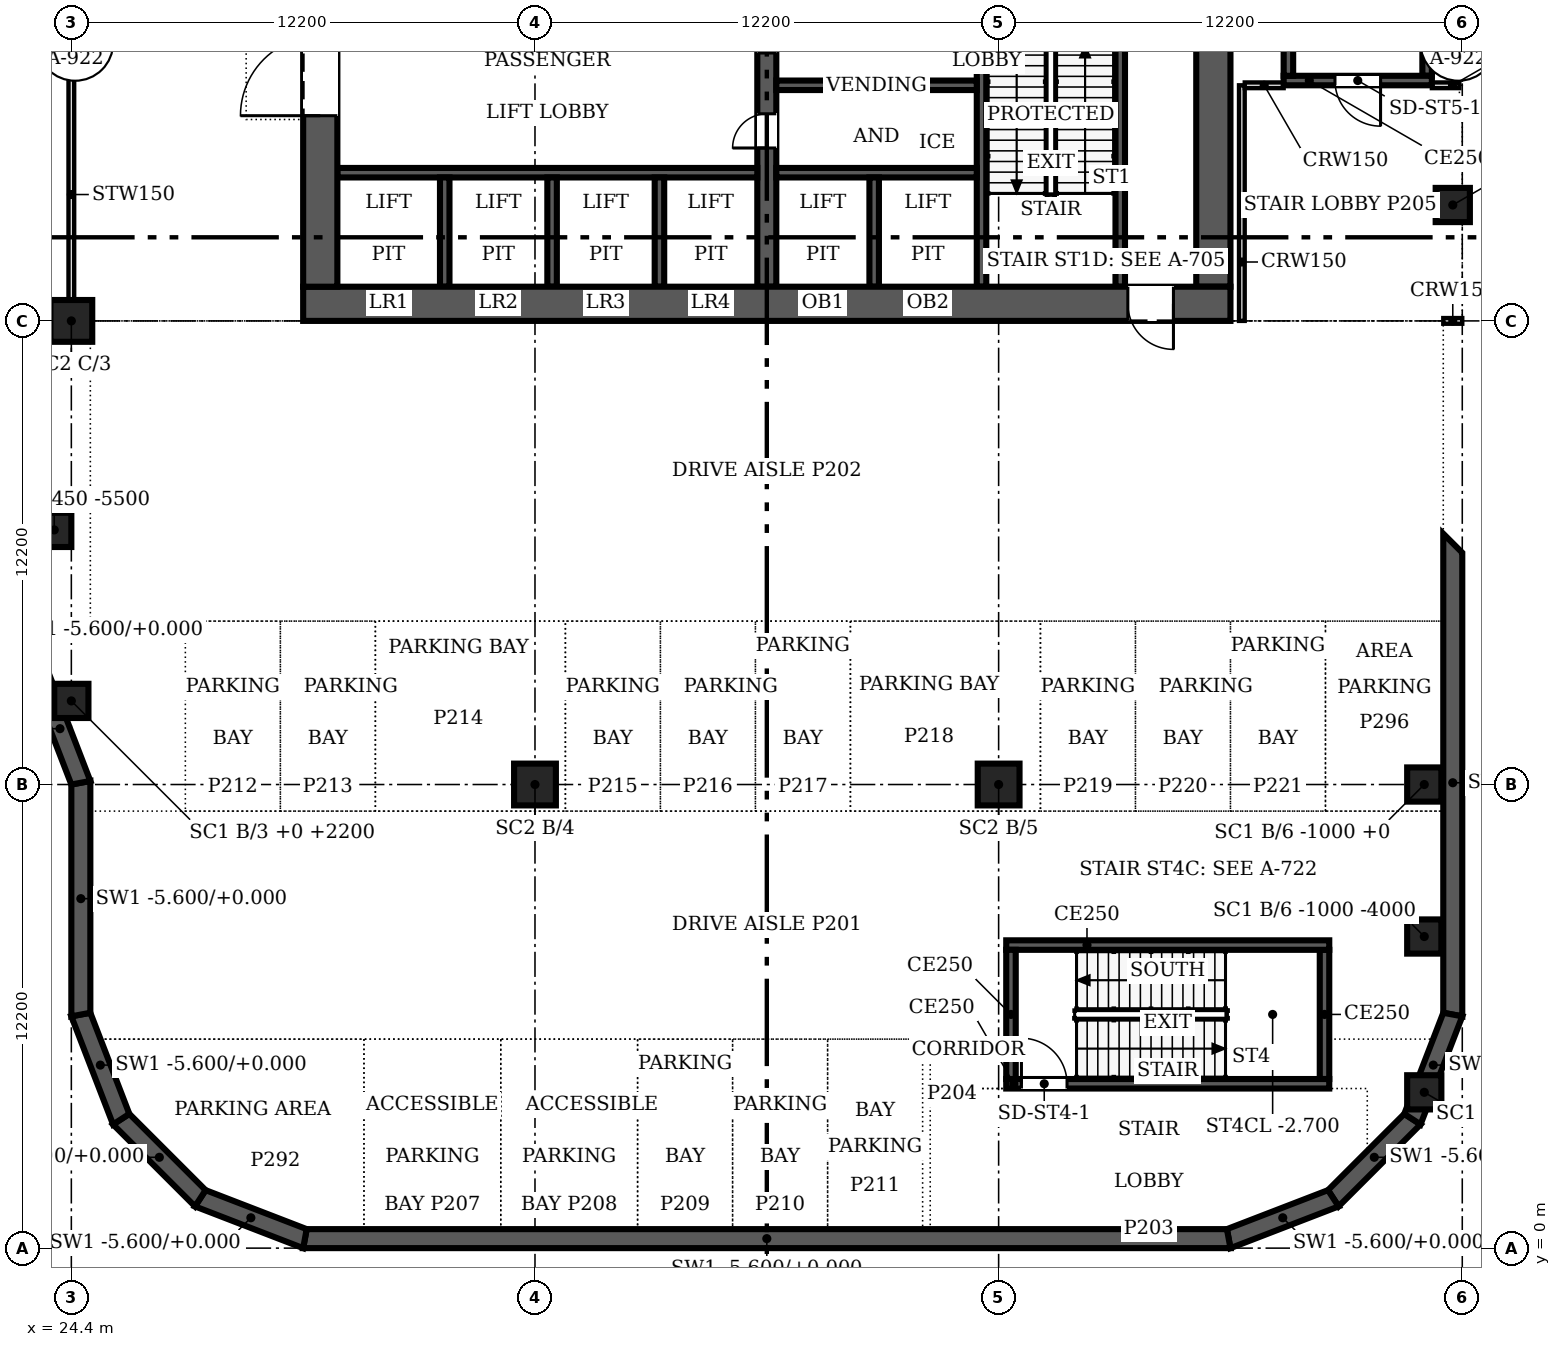
"""IFC4 building model, lengths in metres.
Left out: names, types, materials, properties, quantities, classifications, styles, units other than length and angle.
Written with IfcOpenShell. Run it as: python <this file> out.ifc"""

import sys

from ifc_helpers import new_model, si_unit, direction, frame, frame_2d, origin, origin_2d, place, context, subcontext, project, spatial, polyline, rectangle, outline, extrude, source, transform, mapped, element, fill, save


model = new_model("IFC4")
c1 = context("Model", 3, precision=1e-05, world=origin(), true_north=direction((0.0, 1.0)))
c2 = subcontext(c1, "Body", "Model", "MODEL_VIEW")
j1 = project(units=[si_unit("LENGTHUNIT", "METRE"), si_unit("PLANEANGLEUNIT", "RADIAN")], contexts=[c1])
p1 = place(None, origin())
s1 = spatial("IfcSite", under=j1, at=p1, CompositionType="ELEMENT")
p2 = place(p1, origin())
s2 = spatial("IfcBuilding", under=s1, at=p2, CompositionType="ELEMENT")
p3 = place(p2, frame((0.0, 0.0, -5.4)))
s3 = spatial("IfcBuildingStorey", under=s2, at=p3, CompositionType="ELEMENT", Elevation=-5.4)
p4 = place(p3, frame((0.0, 0.0, -0.2)))
e1 = element("IfcWall", 1, at=p4, inside=s3, PredefinedType="SOLIDWALL", context=c2, shape_type="SweptSolid", body=[
    extrude(outline(polyline([(57.467, 1.526), (57.746, 1.098), (59.902, 3.254), (59.474, 3.533), (57.467, 1.526)])), origin(), (0.0, 0.0, 1.0), 5.6),
])
p5 = place(p3, frame((0.0, 0.0, -0.2)))
e2 = element("IfcWall", 2, at=p5, inside=s3, PredefinedType="SOLIDWALL", context=c2, shape_type="SweptSolid", body=[
    extrude(outline(polyline([(54.807, 0.5), (54.9, 0.0), (57.746, 1.098), (57.467, 1.526), (54.807, 0.5)])), origin(), (0.0, 0.0, 1.0), 5.6),
])
p6 = place(p3, frame((0.0, 0.0, -0.2)))
e3 = element("IfcWall", 3, at=p6, inside=s3, PredefinedType="SOLIDWALL", context=c2, shape_type="SweptSolid", body=[
    extrude(outline(polyline([(30.5, 0.0), (54.9, 0.0), (54.807, 0.5), (30.593, 0.5), (30.5, 0.0)])), origin(), (0.0, 0.0, 1.0), 5.6),
])
p7 = place(p3, frame((0.0, 0.0, -0.2)))
e4 = element("IfcWall", 4, at=p7, inside=s3, PredefinedType="SOLIDWALL", context=c2, shape_type="SweptSolid", body=[
    extrude(outline(polyline([(27.654, 1.098), (30.5, 0.0), (30.593, 0.5), (27.933, 1.526), (27.654, 1.098)])), origin(), (0.0, 0.0, 1.0), 5.6),
])
p8 = place(p3, frame((0.0, 0.0, -0.2)))
e5 = element("IfcWall", 5, at=p8, inside=s3, PredefinedType="SOLIDWALL", context=c2, shape_type="SweptSolid", body=[
    extrude(outline(polyline([(25.498, 3.254), (27.654, 1.098), (27.933, 1.526), (25.926, 3.533), (25.498, 3.254)])), origin(), (0.0, 0.0, 1.0), 5.6),
])
p9 = place(p3, frame((0.0, 0.0, -0.2)))
e6 = element("IfcWall", 6, at=p9, inside=s3, PredefinedType="SOLIDWALL", context=c2, shape_type="SweptSolid", body=[
    extrude(outline(polyline([(24.4, 6.1), (25.498, 3.254), (25.926, 3.533), (24.9, 6.193), (24.4, 6.1)])), origin(), (0.0, 0.0, 1.0), 5.6),
])
p10 = place(p3, frame((0.0, 0.0, -0.2)))
e7 = element("IfcWall", 7, at=p10, inside=s3, PredefinedType="SOLIDWALL", context=c2, shape_type="SweptSolid", body=[
    extrude(outline(polyline([(24.4, 6.1), (24.9, 6.193), (24.9, 12.293), (24.4, 12.2), (24.4, 6.1)])), origin(), (0.0, 0.0, 1.0), 5.6),
])
p11 = place(p3, frame((0.0, 0.0, -0.2)))
e8 = element("IfcWall", 8, at=p11, inside=s3, PredefinedType="SOLIDWALL", context=c2, shape_type="SweptSolid", body=[
    extrude(outline(polyline([(23.302, 15.046), (24.4, 12.2), (24.9, 12.293), (23.731, 15.324), (23.302, 15.046)])), origin(), (0.0, 0.0, 1.0), 5.6),
])
p12 = place(p3, frame((0.0, 0.0, -0.2)))
e9 = element("IfcWall", 9, at=p12, inside=s3, PredefinedType="SOLIDWALL", context=c2, shape_type="SweptSolid", body=[
    extrude(outline(polyline([(60.5, 18.8), (61.0, 18.3), (138.7, 18.3), (138.2, 18.8), (60.5, 18.8)])), origin(), (0.0, 0.0, 1.0), 5.6),
])
p13 = place(p3, frame((0.0, 0.0, -0.2)))
e10 = element("IfcWall", 10, at=p13, inside=s3, PredefinedType="SOLIDWALL", context=c2, shape_type="SweptSolid", body=[
    extrude(outline(polyline([(60.5, 6.193), (61.0, 6.1), (61.0, 18.3), (60.5, 18.8), (60.5, 6.193)])), origin(), (0.0, 0.0, 1.0), 5.6),
])
p14 = place(p3, frame((0.0, 0.0, -0.2)))
e11 = element("IfcWall", 11, at=p14, inside=s3, PredefinedType="SOLIDWALL", context=c2, shape_type="SweptSolid", body=[
    extrude(outline(polyline([(59.474, 3.533), (59.902, 3.254), (61.0, 6.1), (60.5, 6.193), (59.474, 3.533)])), origin(), (0.0, 0.0, 1.0), 5.6),
])
p15 = place(p3, frame((60.75, 27.45, 0.0), z_axis=(0.0, 0.0, 1.0), x_axis=(1.0, 0.0, 0.0)))
e12 = element("IfcColumn", 12, at=p15, inside=s3, PredefinedType="COLUMN", context=c2, shape_type="SweptSolid", body=[
    extrude(rectangle(XDim=0.9, YDim=0.9, at=origin_2d()), origin(), (0.0, 0.0, 1.0), 5.15),
])
for number, where, z_axis, x_axis in (
    (13, (24.4, 24.4, 0.0), (0.0, 0.0, 1.0), (1.0, 0.0, 0.0)),
    (14, (36.6, 12.2, 0.0), (0.0, 0.0, 1.0), (1.0, 0.0, 0.0)),
    (15, (48.8, 12.2, 0.0), (0.0, 0.0, 1.0), (1.0, 0.0, 0.0)),
):
    element("IfcColumn", number, at=place(p3, frame(where, z_axis=z_axis, x_axis=x_axis)), inside=s3, PredefinedType="COLUMN", context=c2, shape_type="SweptSolid", body=[
        extrude(rectangle(XDim=1.1, YDim=1.1, at=origin_2d()), origin(), (0.0, 0.0, 1.0), 5.15),
    ])
for number, where, z_axis, x_axis in (
    (16, (61.0, 19.0, 0.0), (0.0, 0.0, 1.0), (1.0, 0.0, 0.0)),
    (17, (60.0, 12.2, 0.0), (0.0, 0.0, 1.0), (1.0, 0.0, 0.0)),
    (18, (24.4, 14.4, 0.0), (0.0, 0.0, 1.0), (1.0, 0.0, 0.0)),
    (19, (60.0, 8.2, 0.0), (0.0, 0.0, 1.0), (1.0, 0.0, 0.0)),
    (20, (60.0, 4.1, 0.0), (0.0, 0.0, 1.0), (1.0, 0.0, 0.0)),
    (21, (61.0, 18.1, 0.0), (0.0, 0.0, 1.0), (1.0, 0.0, 0.0)),
    (22, (23.95, 18.9, 0.0), (0.0, 0.0, 1.0), (1.0, 0.0, 0.0)),
):
    element("IfcColumn", number, at=place(p3, frame(where, z_axis=z_axis, x_axis=x_axis)), inside=s3, PredefinedType="COLUMN", context=c2, shape_type="SweptSolid", body=[
        extrude(rectangle(XDim=0.9, YDim=0.9, at=origin_2d()), origin(), (0.0, 0.0, 1.0), 5.15),
    ])
p16 = place(p3, frame((54.9, 24.85, 0.0), z_axis=(0.0, 0.0, 1.0), x_axis=(-1.0, 0.0, 0.0)))
e23 = element("IfcWall", 23, at=p16, inside=s3, PredefinedType="SHEAR", context=c2, shape_type="SweptSolid", body=[
    extrude(rectangle(XDim=24.4, YDim=0.9, at=frame_2d((12.2, 0.0))), origin(), (0.0, 0.0, 1.0), 5.4),
])
m1 = source(origin(), c2, "Body", "SweptSolid", [
    extrude(rectangle(XDim=1.2, YDim=2.1, at=frame_2d((0.6, 1.05))), frame((0.0, 0.46, 0.0), z_axis=(0.0, -1.0, 0.0), x_axis=(1.0, 0.0, 0.0)), (0.0, 0.0, 1.0), 0.92),
])
p17 = place(p16, frame((1.5, 0.0, 0.0)))
e24 = element("IfcOpeningElement", 24, at=p17, cuts=e23, PredefinedType="OPENING", context=c2, shape_type="MappedRepresentation", body=[
    mapped(m1, transform((0.0, 0.0, 0.0), scale=1.0)),
])
p18 = place(p3, frame((30.95, 25.3, 0.0), z_axis=(0.0, 0.0, 1.0), x_axis=(0.0, 1.0, 0.0)))
e25 = element("IfcWall", 25, at=p18, inside=s3, PredefinedType="SHEAR", context=c2, shape_type="SweptSolid", body=[
    extrude(rectangle(XDim=22.6, YDim=0.9, at=frame_2d((11.3, 0.0))), origin(), (0.0, 0.0, 1.0), 5.4),
])
m2 = source(origin(), c2, "Body", "SweptSolid", [
    extrude(rectangle(XDim=2.1, YDim=2.4, at=frame_2d((1.05, 1.2))), frame((0.0, 0.46, 0.0), z_axis=(0.0, -1.0, 0.0), x_axis=(1.0, 0.0, 0.0)), (0.0, 0.0, 1.0), 0.92),
])
p19 = place(p18, frame((4.5, 0.0, 0.0)))
e26 = element("IfcOpeningElement", 26, at=p19, cuts=e25, PredefinedType="OPENING", context=c2, shape_type="MappedRepresentation", body=[
    mapped(m2, transform((0.0, 0.0, 0.0), scale=1.0)),
])
p20 = place(p18, frame((16.0, 0.0, 0.0)))
e27 = element("IfcOpeningElement", 27, at=p20, cuts=e25, PredefinedType="OPENING", context=c2, shape_type="MappedRepresentation", body=[
    mapped(m2, transform((0.0, 0.0, 0.0), scale=1.0)),
])
p21 = place(p3, frame((54.45, 47.9, 0.0), z_axis=(0.0, 0.0, 1.0), x_axis=(0.0, -1.0, 0.0)))
e28 = element("IfcWall", 28, at=p21, inside=s3, PredefinedType="SHEAR", context=c2, shape_type="SweptSolid", body=[
    extrude(rectangle(XDim=22.6, YDim=0.9, at=frame_2d((11.3, 0.0))), origin(), (0.0, 0.0, 1.0), 5.4),
])
p22 = place(p21, frame((4.6, 0.0, 0.0)))
e29 = element("IfcOpeningElement", 29, at=p22, cuts=e28, PredefinedType="OPENING", context=c2, shape_type="MappedRepresentation", body=[
    mapped(m1, transform((0.0, 0.0, 0.0), scale=1.0)),
])
p23 = place(p3, frame((42.7, 36.35, 0.0), z_axis=(0.0, 0.0, 1.0), x_axis=(0.0, -1.0, 0.0)))
e30 = element("IfcWall", 30, at=p23, inside=s3, PredefinedType="SHEAR", context=c2, shape_type="SweptSolid", body=[
    extrude(rectangle(XDim=11.05, YDim=0.5, at=frame_2d((5.525, 0.0))), origin(), (0.0, 0.0, 1.0), 5.4),
])
m3 = source(origin(), c2, "Body", "SweptSolid", [
    extrude(rectangle(XDim=0.9, YDim=2.1, at=frame_2d((0.45, 1.05))), frame((0.0, 0.26, 0.0), z_axis=(0.0, -1.0, 0.0), x_axis=(1.0, 0.0, 0.0)), (0.0, 0.0, 1.0), 0.52),
])
p24 = place(p23, frame((6.5, 0.0, 0.0)))
e31 = element("IfcOpeningElement", 31, at=p24, cuts=e30, PredefinedType="OPENING", context=c2, shape_type="MappedRepresentation", body=[
    mapped(m3, transform((0.0, 0.0, 0.0), scale=1.0)),
])
m4 = source(origin(), c2, "Body", "SweptSolid", [
    extrude(rectangle(XDim=1.1, YDim=2.1, at=frame_2d((0.55, 1.05))), frame((0.0, 0.26, 0.0), z_axis=(0.0, -1.0, 0.0), x_axis=(1.0, 0.0, 0.0)), (0.0, 0.0, 1.0), 0.52),
])
p25 = place(p23, frame((3.8, 0.0, 0.0)))
e32 = element("IfcOpeningElement", 32, at=p25, cuts=e30, PredefinedType="OPENING", context=c2, shape_type="MappedRepresentation", body=[
    mapped(m4, transform((0.0, 0.0, 0.0), scale=1.0)),
])
p26 = place(p3, frame((48.35, 36.35, 0.0), z_axis=(0.0, 0.0, 1.0), x_axis=(0.0, -1.0, 0.0)))
e33 = element("IfcWall", 33, at=p26, inside=s3, PredefinedType="SOLIDWALL", context=c2, shape_type="SweptSolid", body=[
    extrude(rectangle(XDim=11.05, YDim=0.25, at=frame_2d((5.525, 0.0))), origin(), (0.0, 0.0, 1.0), 5.4),
])
m5 = source(origin(), c2, "Body", "SweptSolid", [
    extrude(rectangle(XDim=1.2, YDim=2.1, at=frame_2d((0.6, 1.05))), frame((0.0, 0.135, 0.0), z_axis=(0.0, -1.0, 0.0), x_axis=(1.0, 0.0, 0.0)), (0.0, 0.0, 1.0), 0.27),
])
p27 = place(p26, frame((3.225, 0.0, 0.0)))
e34 = element("IfcOpeningElement", 34, at=p27, cuts=e33, PredefinedType="OPENING", context=c2, shape_type="MappedRepresentation", body=[
    mapped(m5, transform((0.0, 0.0, 0.0), scale=1.0)),
])
p28 = place(p3, frame((31.4, 28.3, 0.0), z_axis=(0.0, 0.0, 1.0), x_axis=(1.0, 0.0, 0.0)))
e35 = element("IfcWall", 35, at=p28, inside=s3, PredefinedType="SOLIDWALL", context=c2, shape_type="SweptSolid", body=[
    extrude(rectangle(XDim=11.05, YDim=0.25, at=frame_2d((5.525, 0.0))), origin(), (0.0, 0.0, 1.0), 5.4),
])
p29 = place(p3, frame((42.95, 28.3, 0.0), z_axis=(0.0, 0.0, 1.0), x_axis=(1.0, 0.0, 0.0)))
e36 = element("IfcWall", 36, at=p29, inside=s3, PredefinedType="SOLIDWALL", context=c2, shape_type="SweptSolid", body=[
    extrude(rectangle(XDim=5.275, YDim=0.25, at=frame_2d((2.638, 0.0))), origin(), (0.0, 0.0, 1.0), 5.4),
])
p30 = place(p3, frame((52.0, 25.3, 0.0), z_axis=(0.0, 0.0, 1.0), x_axis=(0.0, 1.0, 0.0)))
e37 = element("IfcWall", 37, at=p30, inside=s3, PredefinedType="SOLIDWALL", context=c2, shape_type="SweptSolid", body=[
    extrude(rectangle(XDim=7.975, YDim=0.25, at=frame_2d((3.987, 0.0))), origin(), (0.0, 0.0, 1.0), 5.4),
])
p31 = place(p30, frame((6.625, 0.0, 0.0)))
e38 = element("IfcOpeningElement", 38, at=p31, cuts=e37, PredefinedType="OPENING", context=c2, shape_type="MappedRepresentation", body=[
    mapped(m5, transform((0.0, 0.0, 0.0), scale=1.0)),
])
p32 = place(p3, frame((42.95, 30.6, 0.0), z_axis=(0.0, 0.0, 1.0), x_axis=(1.0, 0.0, 0.0)))
e39 = element("IfcWall", 39, at=p32, inside=s3, PredefinedType="SOLIDWALL", context=c2, shape_type="SweptSolid", body=[
    extrude(rectangle(XDim=5.275, YDim=0.25, at=frame_2d((2.638, 0.0))), origin(), (0.0, 0.0, 1.0), 5.4),
])
for number, where, z_axis, x_axis in (
    (40, (34.225, 25.3, 0.0), (0.0, 0.0, 1.0), (0.0, 1.0, 0.0)),
    (41, (37.05, 25.3, 0.0), (0.0, 0.0, 1.0), (0.0, 1.0, 0.0)),
    (42, (39.875, 25.3, 0.0), (0.0, 0.0, 1.0), (0.0, 1.0, 0.0)),
    (43, (45.525, 25.3, 0.0), (0.0, 0.0, 1.0), (0.0, 1.0, 0.0)),
):
    element("IfcWall", number, at=place(p3, frame(where, z_axis=z_axis, x_axis=x_axis)), inside=s3, PredefinedType="SOLIDWALL", context=c2, shape_type="SweptSolid", body=[
        extrude(rectangle(XDim=2.875, YDim=0.25, at=frame_2d((1.438, 0.0))), origin(), (0.0, 0.0, 1.0), 5.4),
    ])
p33 = place(p3, frame((57.5, 4.325, 0.0), z_axis=(0.0, 0.0, 1.0), x_axis=(-1.0, 0.0, 0.0)))
e44 = element("IfcWall", 44, at=p33, inside=s3, PredefinedType="SOLIDWALL", context=c2, shape_type="SweptSolid", body=[
    extrude(rectangle(XDim=8.5, YDim=0.25, at=frame_2d((4.25, 0.0))), origin(), (0.0, 0.0, 1.0), 5.4),
])
p34 = place(p33, frame((6.9, 0.0, 0.0)))
e45 = element("IfcOpeningElement", 45, at=p34, cuts=e44, PredefinedType="OPENING", context=c2, shape_type="MappedRepresentation", body=[
    mapped(m5, transform((0.0, 0.0, 0.0), scale=1.0)),
])
p35 = place(p3, frame((49.125, 4.45, 0.0), z_axis=(0.0, 0.0, 1.0), x_axis=(0.0, 1.0, 0.0)))
e46 = element("IfcWall", 46, at=p35, inside=s3, PredefinedType="SOLIDWALL", context=c2, shape_type="SweptSolid", body=[
    extrude(rectangle(XDim=3.4, YDim=0.25, at=frame_2d((1.7, 0.0))), origin(), (0.0, 0.0, 1.0), 5.4),
])
p36 = place(p3, frame((49.0, 7.975, 0.0), z_axis=(0.0, 0.0, 1.0), x_axis=(1.0, 0.0, 0.0)))
e47 = element("IfcWall", 47, at=p36, inside=s3, PredefinedType="SOLIDWALL", context=c2, shape_type="SweptSolid", body=[
    extrude(rectangle(XDim=8.5, YDim=0.25, at=frame_2d((4.25, 0.0))), origin(), (0.0, 0.0, 1.0), 5.4),
])
p37 = place(p3, frame((57.375, 7.85, 0.0), z_axis=(0.0, 0.0, 1.0), x_axis=(0.0, -1.0, 0.0)))
e48 = element("IfcWall", 48, at=p37, inside=s3, PredefinedType="SOLIDWALL", context=c2, shape_type="SweptSolid", body=[
    extrude(rectangle(XDim=3.4, YDim=0.25, at=frame_2d((1.7, 0.0))), origin(), (0.0, 0.0, 1.0), 5.4),
])
p38 = place(p3, frame((60.2, 30.725, 0.0), z_axis=(0.0, 0.0, 1.0), x_axis=(-1.0, 0.0, 0.0)))
e49 = element("IfcWall", 49, at=p38, inside=s3, PredefinedType="SOLIDWALL", context=c2, shape_type="SweptSolid", body=[
    extrude(rectangle(XDim=3.9, YDim=0.25, at=frame_2d((1.95, 0.0))), origin(), (0.0, 0.0, 1.0), 5.4),
])
p39 = place(p38, frame((1.35, 0.0, 0.0)))
e50 = element("IfcOpeningElement", 50, at=p39, cuts=e49, PredefinedType="OPENING", context=c2, shape_type="MappedRepresentation", body=[
    mapped(m5, transform((0.0, 0.0, 0.0), scale=1.0)),
])
for number, where, z_axis, x_axis in (
    (51, (56.425, 30.85, 0.0), (0.0, 0.0, 1.0), (0.0, 1.0, 0.0)),
    (52, (60.075, 38.85, 0.0), (0.0, 0.0, 1.0), (0.0, -1.0, 0.0)),
):
    element("IfcWall", number, at=place(p3, frame(where, z_axis=z_axis, x_axis=x_axis)), inside=s3, PredefinedType="SOLIDWALL", context=c2, shape_type="SweptSolid", body=[
        extrude(rectangle(XDim=8.0, YDim=0.25, at=frame_2d((4.0, 0.0))), origin(), (0.0, 0.0, 1.0), 5.4),
    ])
p40 = place(p3, frame((55.2, 24.4, 0.0), z_axis=(0.0, 0.0, 1.0), x_axis=(0.0, 1.0, 0.0)))
e53 = element("IfcWall", 53, at=p40, inside=s3, PredefinedType="PARTITIONING", context=c2, shape_type="SweptSolid", body=[
    extrude(rectangle(XDim=6.2, YDim=0.15, at=frame_2d((3.1, 0.0))), origin(), (0.0, 0.0, 1.0), 4.315),
])
p41 = place(p3, frame((60.5, 24.4, 0.0), z_axis=(0.0, 0.0, 1.0), x_axis=(1.0, 0.0, 0.0)))
e54 = element("IfcWall", 54, at=p41, inside=s3, PredefinedType="PARTITIONING", context=c2, shape_type="SweptSolid", body=[
    extrude(rectangle(XDim=0.5, YDim=0.15, at=frame_2d((0.25, 0.0))), origin(), (0.0, 0.0, 1.0), 4.315),
])
p42 = place(p3, frame((24.4, 24.951, 0.0), z_axis=(0.0, 0.0, 1.0), x_axis=(0.0, 1.0, 0.0)))
e55 = element("IfcWall", 55, at=p42, inside=s3, PredefinedType="PARTITIONING", context=c2, shape_type="SweptSolid", body=[
    extrude(rectangle(XDim=11.098, YDim=0.15, at=frame_2d((5.549, 0.0))), origin(), (0.0, 0.0, 1.0), 4.315),
])
p43 = place(p3, frame((61.0, 29.8, 0.0), z_axis=(0.0, 0.0, 1.0), x_axis=(0.0, 1.0, 0.0)))
e56 = element("IfcWall", 56, at=p43, inside=s3, PredefinedType="PARTITIONING", context=c2, shape_type="SweptSolid", body=[
    extrude(rectangle(XDim=0.8, YDim=0.15, at=frame_2d((0.4, 0.0))), origin(), (0.0, 0.0, 1.0), 4.315),
])
p44 = place(p3, frame((55.276, 30.6, 0.0), z_axis=(0.0, 0.0, 1.0), x_axis=(1.0, 0.0, 0.0)))
e57 = element("IfcWall", 57, at=p44, inside=s3, PredefinedType="PARTITIONING", context=c2, shape_type="SweptSolid", body=[
    extrude(rectangle(XDim=1.024, YDim=0.15, at=frame_2d((0.512, 0.0))), origin(), (0.0, 0.0, 1.0), 4.315),
])
p45 = place(p3, frame((60.2, 30.6, 0.0), z_axis=(0.0, 0.0, 1.0), x_axis=(1.0, 0.0, 0.0)))
e58 = element("IfcWall", 58, at=p45, inside=s3, PredefinedType="PARTITIONING", context=c2, shape_type="SweptSolid", body=[
    extrude(rectangle(XDim=0.724, YDim=0.15, at=frame_2d((0.362, 0.0))), origin(), (0.0, 0.0, 1.0), 4.315),
])
m6 = source(origin(), c2, "Body", "SweptSolid", [
    extrude(rectangle(XDim=1.2, YDim=2.1, at=frame_2d((0.6, 1.05))), frame((0.0, 0.025, 0.0), z_axis=(0.0, -1.0, 0.0), x_axis=(1.0, 0.0, 0.0)), (0.0, 0.0, 1.0), 0.05),
])
p46 = place(p17, origin())
e59 = element("IfcDoor", 59, at=p46, inside=s3, OperationType="SINGLE_SWING_LEFT", PredefinedType="DOOR", context=c2, shape_type="MappedRepresentation", body=[
    mapped(m6, transform((0.0, 0.0, 0.0), scale=1.0)),
])
fill(e24, e59)
m7 = source(origin(), c2, "Body", "SweptSolid", [
    extrude(rectangle(XDim=2.1, YDim=2.4, at=frame_2d((1.05, 1.2))), frame((0.0, 0.025, 0.0), z_axis=(0.0, -1.0, 0.0), x_axis=(1.0, 0.0, 0.0)), (0.0, 0.0, 1.0), 0.05),
])
p47 = place(p19, origin())
e60 = element("IfcDoor", 60, at=p47, inside=s3, OperationType="DOUBLE_DOOR_SINGLE_SWING", PredefinedType="DOOR", context=c2, shape_type="MappedRepresentation", body=[
    mapped(m7, transform((0.0, 0.0, 0.0), scale=1.0)),
])
fill(e26, e60)
m8 = source(origin(), c2, "Body", "SweptSolid", [
    extrude(rectangle(XDim=0.9, YDim=2.1, at=frame_2d((0.45, 1.05))), frame((0.0, 0.025, 0.0), z_axis=(0.0, -1.0, 0.0), x_axis=(1.0, 0.0, 0.0)), (0.0, 0.0, 1.0), 0.05),
])
p48 = place(p24, origin())
e61 = element("IfcDoor", 61, at=p48, inside=s3, OperationType="SINGLE_SWING_RIGHT", PredefinedType="DOOR", context=c2, shape_type="MappedRepresentation", body=[
    mapped(m8, transform((0.0, 0.0, 0.0), scale=1.0)),
])
fill(e31, e61)
m9 = source(origin(), c2, "Body", "SweptSolid", [
    extrude(rectangle(XDim=1.1, YDim=2.1, at=frame_2d((0.55, 1.05))), frame((0.0, 0.025, 0.0), z_axis=(0.0, -1.0, 0.0), x_axis=(1.0, 0.0, 0.0)), (0.0, 0.0, 1.0), 0.05),
])
p49 = place(p25, origin())
e62 = element("IfcDoor", 62, at=p49, inside=s3, OperationType="SINGLE_SWING_LEFT", PredefinedType="DOOR", context=c2, shape_type="MappedRepresentation", body=[
    mapped(m9, transform((0.0, 0.0, 0.0), scale=1.0)),
])
fill(e32, e62)
p50 = place(p34, origin())
e63 = element("IfcDoor", 63, at=p50, inside=s3, OperationType="SINGLE_SWING_RIGHT", PredefinedType="DOOR", context=c2, shape_type="MappedRepresentation", body=[
    mapped(m6, transform((0.0, 0.0, 0.0), scale=1.0)),
])
fill(e45, e63)
p51 = place(p39, origin())
e64 = element("IfcDoor", 64, at=p51, inside=s3, OperationType="SINGLE_SWING_LEFT", PredefinedType="DOOR", context=c2, shape_type="MappedRepresentation", body=[
    mapped(m6, transform((0.0, 0.0, 0.0), scale=1.0)),
])
fill(e50, e64)
save(model, sys.argv[1])
